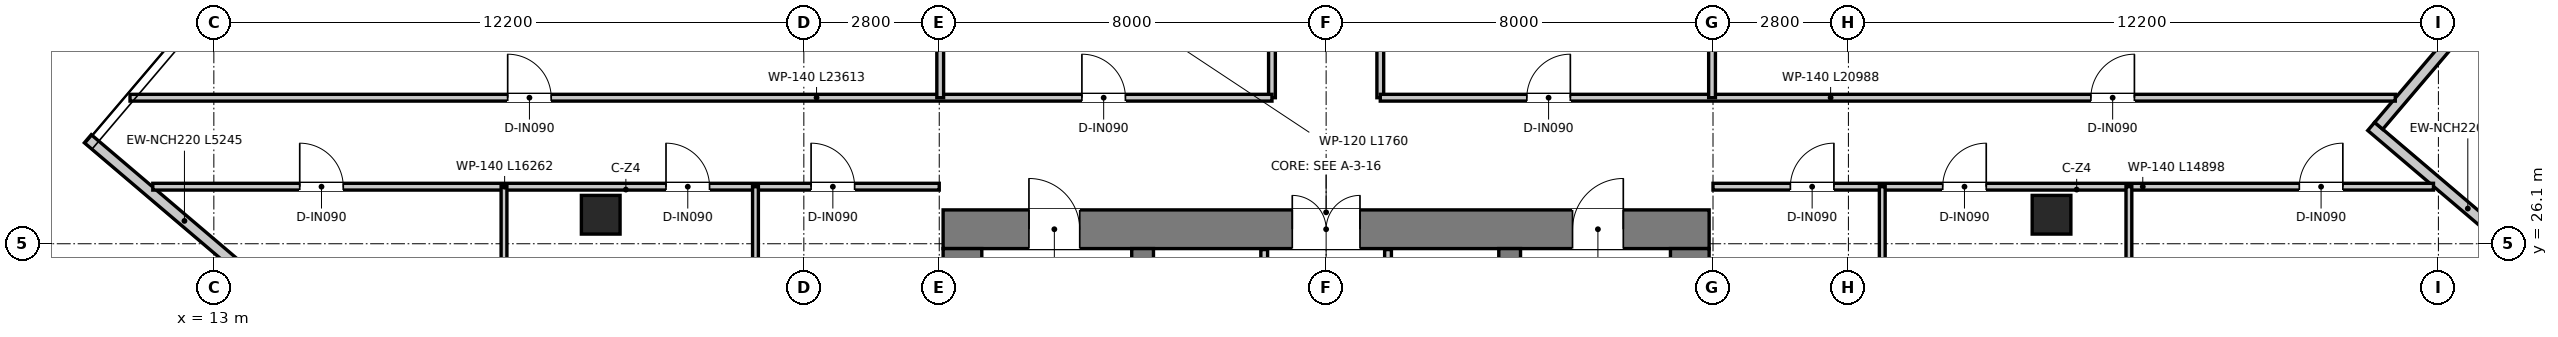
"""IFC4 building model, lengths in metres.
Left out: names, types, materials, properties, quantities, classifications, styles, units other than length and angle.
Written with IfcOpenShell. Run it as: python <this file> out.ifc"""

import sys

from ifc_helpers import new_model, si_unit, direction, frame, frame_2d, origin, origin_2d, place, context, subcontext, project, spatial, rectangle, extrude, source, transform, mapped, element, fill, save


model = new_model("IFC4")
c1 = context("Model", 3, precision=1e-05, world=origin(), true_north=direction((0.0, 1.0)))
c2 = subcontext(c1, "Body", "Model", "MODEL_VIEW")
j1 = project(units=[si_unit("LENGTHUNIT", "METRE"), si_unit("PLANEANGLEUNIT", "RADIAN")], contexts=[c1])
p1 = place(None, origin())
s1 = spatial("IfcSite", under=j1, at=p1, CompositionType="ELEMENT")
p2 = place(p1, origin())
s2 = spatial("IfcBuilding", under=s1, at=p2, CompositionType="ELEMENT")
p3 = place(p2, frame((0.0, 0.0, 207.3)))
s3 = spatial("IfcBuildingStorey", under=s2, at=p3, CompositionType="ELEMENT", Elevation=207.3)
p4 = place(p3, frame((28.08, 26.4, 0.0), z_axis=(0.0, 0.0, 1.0), x_axis=(1.0, 0.0, 0.0)))
e1 = element("IfcWall", 1, at=p4, inside=s3, PredefinedType="SHEAR", context=c2, shape_type="SweptSolid", body=[
    extrude(rectangle(XDim=15.84, YDim=0.8, at=frame_2d((7.92, 0.0))), origin(), (0.0, 0.0, 1.0), 3.95),
])
p5 = place(p4, frame((7.22, 0.0, 0.0)))
e2 = element("IfcOpeningElement", 2, at=p5, cuts=e1, PredefinedType="OPENING", context=c2, shape_type="SweptSolid", body=[
    extrude(rectangle(XDim=1.4, YDim=2.2, at=frame_2d((0.7, 1.1))), frame((0.0, 0.41, 0.0), z_axis=(0.0, -1.0, 0.0), x_axis=(1.0, 0.0, 0.0)), (0.0, 0.0, 1.0), 0.82),
])
p6 = place(p4, frame((1.775, 0.0, 0.0)))
e3 = element("IfcOpeningElement", 3, at=p6, cuts=e1, PredefinedType="OPENING", context=c2, shape_type="SweptSolid", body=[
    extrude(rectangle(XDim=1.05, YDim=2.1, at=frame_2d((0.525, 1.05))), frame((0.0, 0.41, 0.0), z_axis=(0.0, -1.0, 0.0), x_axis=(1.0, 0.0, 0.0)), (0.0, 0.0, 1.0), 0.82),
])
p7 = place(p4, frame((13.015, 0.0, 0.0)))
e4 = element("IfcOpeningElement", 4, at=p7, cuts=e1, PredefinedType="OPENING", context=c2, shape_type="SweptSolid", body=[
    extrude(rectangle(XDim=1.05, YDim=2.1, at=frame_2d((0.525, 1.05))), frame((0.0, 0.41, 0.0), z_axis=(0.0, -1.0, 0.0), x_axis=(1.0, 0.0, 0.0)), (0.0, 0.0, 1.0), 0.82),
])
for number, where, z_axis, x_axis in (
    (5, (28.48, 11.3, 0.0), (0.0, 0.0, 1.0), (0.0, 1.0, 0.0)),
    (6, (43.52, 11.3, 0.0), (0.0, 0.0, 1.0), (0.0, 1.0, 0.0)),
):
    element("IfcWall", number, at=place(p3, frame(where, z_axis=z_axis, x_axis=x_axis)), inside=s3, PredefinedType="SHEAR", context=c2, shape_type="SweptSolid", body=[
        extrude(rectangle(XDim=14.7, YDim=0.8, at=frame_2d((7.35, 0.0))), origin(), (0.0, 0.0, 1.0), 3.95),
    ])
p8 = place(p3, frame((32.205, 13.22, 0.0), z_axis=(0.0, 0.0, 1.0), x_axis=(0.0, 1.0, 0.0)))
e7 = element("IfcWall", 7, at=p8, inside=s3, PredefinedType="SHEAR", context=c2, shape_type="SweptSolid", body=[
    extrude(rectangle(XDim=12.78, YDim=0.45, at=frame_2d((6.39, 0.0))), origin(), (0.0, 0.0, 1.0), 3.95),
])
p9 = place(p8, frame((10.58, 0.0, 0.0)))
e8 = element("IfcOpeningElement", 8, at=p9, cuts=e7, PredefinedType="OPENING", context=c2, shape_type="SweptSolid", body=[
    extrude(rectangle(XDim=1.1, YDim=2.15, at=frame_2d((0.55, 1.075))), frame((0.0, 0.235, 0.0), z_axis=(0.0, -1.0, 0.0), x_axis=(1.0, 0.0, 0.0)), (0.0, 0.0, 1.0), 0.47),
])
p10 = place(p3, frame((39.795, 13.22, 0.0), z_axis=(0.0, 0.0, 1.0), x_axis=(0.0, 1.0, 0.0)))
e9 = element("IfcWall", 9, at=p10, inside=s3, PredefinedType="SHEAR", context=c2, shape_type="SweptSolid", body=[
    extrude(rectangle(XDim=12.78, YDim=0.45, at=frame_2d((6.39, 0.0))), origin(), (0.0, 0.0, 1.0), 3.95),
])
p11 = place(p10, frame((10.58, 0.0, 0.0)))
e10 = element("IfcOpeningElement", 10, at=p11, cuts=e9, PredefinedType="OPENING", context=c2, shape_type="SweptSolid", body=[
    extrude(rectangle(XDim=1.1, YDim=2.15, at=frame_2d((0.55, 1.075))), frame((0.0, 0.235, 0.0), z_axis=(0.0, -1.0, 0.0), x_axis=(1.0, 0.0, 0.0)), (0.0, 0.0, 1.0), 0.47),
])
m1 = source(origin(), c2, "Body", "SweptSolid", [
    extrude(rectangle(XDim=0.8, YDim=0.8, at=origin_2d()), origin(), (0.0, 0.0, 1.0), 3.95),
])
for number, where, z_axis, x_axis in (
    (11, (21.0, 26.7, 0.0), (0.0, 0.0, 1.0), (1.0, 0.0, 0.0)),
    (12, (51.0, 26.7, 0.0), (0.0, 0.0, 1.0), (1.0, 0.0, 0.0)),
):
    element("IfcColumn", number, at=place(p3, frame(where, z_axis=z_axis, x_axis=x_axis)), inside=s3, PredefinedType="COLUMN", context=c2, shape_type="MappedRepresentation", body=[
        mapped(m1, transform((0.0, 0.0, 0.0), x_axis=(1.0, 0.0, 0.0), y_axis=(0.0, 1.0, 0.0), z_axis=(0.0, 0.0, 1.0), scale=1.0)),
    ])
for number, where, z_axis, x_axis in (
    (13, (10.394, 28.271, 0.0), (0.0, 0.0, 1.0), (0.762, -0.648, 0.0)),
    (14, (61.606, 25.129, 0.0), (0.0, 0.0, 1.0), (-0.762, 0.648, 0.0)),
):
    element("IfcWall", number, at=place(p3, frame(where, z_axis=z_axis, x_axis=x_axis)), inside=s3, PredefinedType="ELEMENTEDWALL", context=c2, shape_type="SweptSolid", body=[
        extrude(rectangle(XDim=5.245, YDim=0.22, at=frame_2d((2.623, 0.0))), origin(), (0.0, 0.0, 1.0), 3.67),
    ])
p12 = place(p3, frame((57.765, 28.539, 0.0), z_axis=(0.0, 0.0, 1.0), x_axis=(0.647789440707, 0.761819427757, 0.0)))
e15 = element("IfcWall", 15, at=p12, inside=s3, PredefinedType="ELEMENTEDWALL", context=c2, shape_type="SweptSolid", body=[
    extrude(rectangle(XDim=5.025, YDim=0.22, at=frame_2d((2.512, 0.0))), origin(), (0.0, 0.0, 1.0), 3.67),
])
p13 = place(p3, frame((34.72, 20.2, 0.0), z_axis=(0.0, 0.0, 1.0), x_axis=(0.0, 1.0, 0.0)))
e16 = element("IfcWall", 16, at=p13, inside=s3, PredefinedType="PARTITIONING", context=c2, shape_type="SweptSolid", body=[
    extrude(rectangle(XDim=5.78, YDim=0.14, at=frame_2d((2.89, 0.0))), origin(), (0.0, 0.0, 1.0), 2.67),
])
p14 = place(p13, frame((1.05, 0.0, 0.0)))
e17 = element("IfcOpeningElement", 17, at=p14, cuts=e16, PredefinedType="OPENING", context=c2, shape_type="SweptSolid", body=[
    extrude(rectangle(XDim=0.9, YDim=2.1, at=frame_2d((0.45, 1.05))), frame((0.0, 0.08, 0.0), z_axis=(0.0, -1.0, 0.0), x_axis=(1.0, 0.0, 0.0)), (0.0, 0.0, 1.0), 0.16),
])
p15 = place(p3, frame((37.28, 20.2, 0.0), z_axis=(0.0, 0.0, 1.0), x_axis=(0.0, 1.0, 0.0)))
e18 = element("IfcWall", 18, at=p15, inside=s3, PredefinedType="PARTITIONING", context=c2, shape_type="SweptSolid", body=[
    extrude(rectangle(XDim=5.78, YDim=0.14, at=frame_2d((2.89, 0.0))), origin(), (0.0, 0.0, 1.0), 2.67),
])
p16 = place(p15, frame((0.95, 0.0, 0.0)))
e19 = element("IfcOpeningElement", 19, at=p16, cuts=e18, PredefinedType="OPENING", context=c2, shape_type="SweptSolid", body=[
    extrude(rectangle(XDim=1.1, YDim=2.15, at=frame_2d((0.55, 1.075))), frame((0.0, 0.08, 0.0), z_axis=(0.0, -1.0, 0.0), x_axis=(1.0, 0.0, 0.0)), (0.0, 0.0, 1.0), 0.16),
])
p17 = place(p3, frame((34.88, 29.12, 0.0), z_axis=(0.0, 0.0, 1.0), x_axis=(0.0, 1.0, 0.0)))
e20 = element("IfcWall", 20, at=p17, inside=s3, PredefinedType="PARTITIONING", context=c2, shape_type="SweptSolid", body=[
    extrude(rectangle(XDim=11.76, YDim=0.14, at=frame_2d((5.88, 0.0))), origin(), (0.0, 0.0, 1.0), 3.03),
])
p18 = place(p17, frame((4.085, 0.0, 0.0)))
e21 = element("IfcOpeningElement", 21, at=p18, cuts=e20, PredefinedType="OPENING", context=c2, shape_type="SweptSolid", body=[
    extrude(rectangle(XDim=0.95, YDim=2.1, at=frame_2d((0.475, 1.05))), frame((0.0, 0.08, 0.0), z_axis=(0.0, -1.0, 0.0), x_axis=(1.0, 0.0, 0.0)), (0.0, 0.0, 1.0), 0.16),
])
p19 = place(p17, frame((6.82, 0.0, 0.0)))
e22 = element("IfcOpeningElement", 22, at=p19, cuts=e20, PredefinedType="OPENING", context=c2, shape_type="SweptSolid", body=[
    extrude(rectangle(XDim=0.9, YDim=2.1, at=frame_2d((0.45, 1.05))), frame((0.0, 0.08, 0.0), z_axis=(0.0, -1.0, 0.0), x_axis=(1.0, 0.0, 0.0)), (0.0, 0.0, 1.0), 0.16),
])
p20 = place(p17, frame((9.83, 0.0, 0.0)))
e23 = element("IfcOpeningElement", 23, at=p20, cuts=e20, PredefinedType="OPENING", context=c2, shape_type="SweptSolid", body=[
    extrude(rectangle(XDim=0.9, YDim=2.1, at=frame_2d((0.45, 1.05))), frame((0.0, 0.08, 0.0), z_axis=(0.0, -1.0, 0.0), x_axis=(1.0, 0.0, 0.0)), (0.0, 0.0, 1.0), 0.16),
])
p21 = place(p3, frame((37.12, 29.12, 0.0), z_axis=(0.0, 0.0, 1.0), x_axis=(0.0, 1.0, 0.0)))
e24 = element("IfcWall", 24, at=p21, inside=s3, PredefinedType="PARTITIONING", context=c2, shape_type="SweptSolid", body=[
    extrude(rectangle(XDim=11.76, YDim=0.14, at=frame_2d((5.88, 0.0))), origin(), (0.0, 0.0, 1.0), 3.03),
])
p22 = place(p21, frame((3.205, 0.0, 0.0)))
e25 = element("IfcOpeningElement", 25, at=p22, cuts=e24, PredefinedType="OPENING", context=c2, shape_type="SweptSolid", body=[
    extrude(rectangle(XDim=0.95, YDim=2.1, at=frame_2d((0.475, 1.05))), frame((0.0, 0.08, 0.0), z_axis=(0.0, -1.0, 0.0), x_axis=(1.0, 0.0, 0.0)), (0.0, 0.0, 1.0), 0.16),
])
p23 = place(p21, frame((6.82, 0.0, 0.0)))
e26 = element("IfcOpeningElement", 26, at=p23, cuts=e24, PredefinedType="OPENING", context=c2, shape_type="SweptSolid", body=[
    extrude(rectangle(XDim=0.9, YDim=2.1, at=frame_2d((0.45, 1.05))), frame((0.0, 0.08, 0.0), z_axis=(0.0, -1.0, 0.0), x_axis=(1.0, 0.0, 0.0)), (0.0, 0.0, 1.0), 0.16),
])
p24 = place(p21, frame((9.83, 0.0, 0.0)))
e27 = element("IfcOpeningElement", 27, at=p24, cuts=e24, PredefinedType="OPENING", context=c2, shape_type="SweptSolid", body=[
    extrude(rectangle(XDim=0.9, YDim=2.1, at=frame_2d((0.45, 1.05))), frame((0.0, 0.08, 0.0), z_axis=(0.0, -1.0, 0.0), x_axis=(1.0, 0.0, 0.0)), (0.0, 0.0, 1.0), 0.16),
])
p25 = place(p3, frame((11.267, 29.12, 0.0), z_axis=(0.0, 0.0, 1.0), x_axis=(1.0, 0.0, 0.0)))
e28 = element("IfcWall", 28, at=p25, inside=s3, PredefinedType="PARTITIONING", context=c2, shape_type="SweptSolid", body=[
    extrude(rectangle(XDim=23.613, YDim=0.14, at=frame_2d((11.807, 0.0))), origin(), (0.0, 0.0, 1.0), 3.03),
])
p26 = place(p25, frame((19.683, 0.0, 0.0)))
e29 = element("IfcOpeningElement", 29, at=p26, cuts=e28, PredefinedType="OPENING", context=c2, shape_type="SweptSolid", body=[
    extrude(rectangle(XDim=0.9, YDim=2.1, at=frame_2d((0.45, 1.05))), frame((0.0, 0.08, 0.0), z_axis=(0.0, -1.0, 0.0), x_axis=(1.0, 0.0, 0.0)), (0.0, 0.0, 1.0), 0.16),
])
p27 = place(p25, frame((7.809, 0.0, 0.0)))
e30 = element("IfcOpeningElement", 30, at=p27, cuts=e28, PredefinedType="OPENING", context=c2, shape_type="SweptSolid", body=[
    extrude(rectangle(XDim=0.9, YDim=2.1, at=frame_2d((0.45, 1.05))), frame((0.0, 0.08, 0.0), z_axis=(0.0, -1.0, 0.0), x_axis=(1.0, 0.0, 0.0)), (0.0, 0.0, 1.0), 0.16),
])
p28 = place(p3, frame((37.12, 29.12, 0.0), z_axis=(0.0, 0.0, 1.0), x_axis=(1.0, 0.0, 0.0)))
e31 = element("IfcWall", 31, at=p28, inside=s3, PredefinedType="PARTITIONING", context=c2, shape_type="SweptSolid", body=[
    extrude(rectangle(XDim=20.988, YDim=0.14, at=frame_2d((10.494, 0.0))), origin(), (0.0, 0.0, 1.0), 3.03),
])
p29 = place(p28, frame((3.03, 0.0, 0.0)))
e32 = element("IfcOpeningElement", 32, at=p29, cuts=e31, PredefinedType="OPENING", context=c2, shape_type="SweptSolid", body=[
    extrude(rectangle(XDim=0.9, YDim=2.1, at=frame_2d((0.45, 1.05))), frame((0.0, 0.08, 0.0), z_axis=(0.0, -1.0, 0.0), x_axis=(1.0, 0.0, 0.0)), (0.0, 0.0, 1.0), 0.16),
])
p30 = place(p28, frame((14.694, 0.0, 0.0)))
e33 = element("IfcOpeningElement", 33, at=p30, cuts=e31, PredefinedType="OPENING", context=c2, shape_type="SweptSolid", body=[
    extrude(rectangle(XDim=0.9, YDim=2.1, at=frame_2d((0.45, 1.05))), frame((0.0, 0.08, 0.0), z_axis=(0.0, -1.0, 0.0), x_axis=(1.0, 0.0, 0.0)), (0.0, 0.0, 1.0), 0.16),
])
p31 = place(p3, frame((11.738, 27.28, 0.0), z_axis=(0.0, 0.0, 1.0), x_axis=(1.0, 0.0, 0.0)))
e34 = element("IfcWall", 34, at=p31, inside=s3, PredefinedType="PARTITIONING", context=c2, shape_type="SweptSolid", body=[
    extrude(rectangle(XDim=16.262, YDim=0.14, at=frame_2d((8.131, 0.0))), origin(), (0.0, 0.0, 1.0), 3.03),
])
p32 = place(p31, frame((3.038, 0.0, 0.0)))
e35 = element("IfcOpeningElement", 35, at=p32, cuts=e34, PredefinedType="OPENING", context=c2, shape_type="SweptSolid", body=[
    extrude(rectangle(XDim=0.9, YDim=2.1, at=frame_2d((0.45, 1.05))), frame((0.0, 0.08, 0.0), z_axis=(0.0, -1.0, 0.0), x_axis=(1.0, 0.0, 0.0)), (0.0, 0.0, 1.0), 0.16),
])
p33 = place(p31, frame((10.612, 0.0, 0.0)))
e36 = element("IfcOpeningElement", 36, at=p33, cuts=e34, PredefinedType="OPENING", context=c2, shape_type="SweptSolid", body=[
    extrude(rectangle(XDim=0.9, YDim=2.1, at=frame_2d((0.45, 1.05))), frame((0.0, 0.08, 0.0), z_axis=(0.0, -1.0, 0.0), x_axis=(1.0, 0.0, 0.0)), (0.0, 0.0, 1.0), 0.16),
])
p34 = place(p31, frame((13.612, 0.0, 0.0)))
e37 = element("IfcOpeningElement", 37, at=p34, cuts=e34, PredefinedType="OPENING", context=c2, shape_type="SweptSolid", body=[
    extrude(rectangle(XDim=0.9, YDim=2.1, at=frame_2d((0.45, 1.05))), frame((0.0, 0.08, 0.0), z_axis=(0.0, -1.0, 0.0), x_axis=(1.0, 0.0, 0.0)), (0.0, 0.0, 1.0), 0.16),
])
p35 = place(p3, frame((44.0, 27.28, 0.0), z_axis=(0.0, 0.0, 1.0), x_axis=(1.0, 0.0, 0.0)))
e38 = element("IfcWall", 38, at=p35, inside=s3, PredefinedType="PARTITIONING", context=c2, shape_type="SweptSolid", body=[
    extrude(rectangle(XDim=14.898, YDim=0.14, at=frame_2d((7.449, 0.0))), origin(), (0.0, 0.0, 1.0), 3.03),
])
p36 = place(p35, frame((1.6, 0.0, 0.0)))
e39 = element("IfcOpeningElement", 39, at=p36, cuts=e38, PredefinedType="OPENING", context=c2, shape_type="SweptSolid", body=[
    extrude(rectangle(XDim=0.9, YDim=2.1, at=frame_2d((0.45, 1.05))), frame((0.0, 0.08, 0.0), z_axis=(0.0, -1.0, 0.0), x_axis=(1.0, 0.0, 0.0)), (0.0, 0.0, 1.0), 0.16),
])
p37 = place(p35, frame((4.75, 0.0, 0.0)))
e40 = element("IfcOpeningElement", 40, at=p37, cuts=e38, PredefinedType="OPENING", context=c2, shape_type="SweptSolid", body=[
    extrude(rectangle(XDim=0.9, YDim=2.1, at=frame_2d((0.45, 1.05))), frame((0.0, 0.08, 0.0), z_axis=(0.0, -1.0, 0.0), x_axis=(1.0, 0.0, 0.0)), (0.0, 0.0, 1.0), 0.16),
])
p38 = place(p35, frame((12.124, 0.0, 0.0)))
e41 = element("IfcOpeningElement", 41, at=p38, cuts=e38, PredefinedType="OPENING", context=c2, shape_type="SweptSolid", body=[
    extrude(rectangle(XDim=0.9, YDim=2.1, at=frame_2d((0.45, 1.05))), frame((0.0, 0.08, 0.0), z_axis=(0.0, -1.0, 0.0), x_axis=(1.0, 0.0, 0.0)), (0.0, 0.0, 1.0), 0.16),
])
for number, where, z_axis, x_axis in (
    (42, (28.02, 29.12, 0.0), (0.0, 0.0, 1.0), (0.0, 1.0, 0.0)),
    (43, (43.98, 29.12, 0.0), (0.0, 0.0, 1.0), (0.0, 1.0, 0.0)),
):
    element("IfcWall", number, at=place(p3, frame(where, z_axis=z_axis, x_axis=x_axis)), inside=s3, PredefinedType="PARTITIONING", context=c2, shape_type="SweptSolid", body=[
        extrude(rectangle(XDim=5.46, YDim=0.14, at=frame_2d((2.73, 0.0))), origin(), (0.0, 0.0, 1.0), 3.37),
    ])
p39 = place(p3, frame((19.0, 14.364, 0.0), z_axis=(0.0, 0.0, 1.0), x_axis=(0.0, 1.0, 0.0)))
e44 = element("IfcWall", 44, at=p39, inside=s3, PredefinedType="PARTITIONING", context=c2, shape_type="SweptSolid", body=[
    extrude(rectangle(XDim=12.916, YDim=0.12, at=frame_2d((6.458, 0.0))), origin(), (0.0, 0.0, 1.0), 3.67),
])
p40 = place(p3, frame((24.2, 9.943, 0.0), z_axis=(0.0, 0.0, 1.0), x_axis=(0.0, 1.0, 0.0)))
e45 = element("IfcWall", 45, at=p40, inside=s3, PredefinedType="PARTITIONING", context=c2, shape_type="SweptSolid", body=[
    extrude(rectangle(XDim=17.337, YDim=0.12, at=frame_2d((8.669, 0.0))), origin(), (0.0, 0.0, 1.0), 3.18),
])
p41 = place(p3, frame((47.5, 8.717, 0.0), z_axis=(0.0, 0.0, 1.0), x_axis=(0.0, 1.0, 0.0)))
e46 = element("IfcWall", 46, at=p41, inside=s3, PredefinedType="PARTITIONING", context=c2, shape_type="SweptSolid", body=[
    extrude(rectangle(XDim=18.563, YDim=0.12, at=frame_2d((9.281, 0.0))), origin(), (0.0, 0.0, 1.0), 3.18),
])
p42 = place(p3, frame((52.6, 14.715, 0.0), z_axis=(0.0, 0.0, 1.0), x_axis=(0.0, 1.0, 0.0)))
e47 = element("IfcWall", 47, at=p42, inside=s3, PredefinedType="PARTITIONING", context=c2, shape_type="SweptSolid", body=[
    extrude(rectangle(XDim=12.565, YDim=0.12, at=frame_2d((6.283, 0.0))), origin(), (0.0, 0.0, 1.0), 3.67),
])
p43 = place(p5, origin())
e48 = element("IfcDoor", 48, at=p43, inside=s3, OperationType="DOUBLE_DOOR_SINGLE_SWING", PredefinedType="DOOR", context=c2, shape_type="SweptSolid", body=[
    extrude(rectangle(XDim=1.4, YDim=2.2, at=frame_2d((0.7, 1.1))), frame((0.0, 0.025, 0.0), z_axis=(0.0, -1.0, 0.0), x_axis=(1.0, 0.0, 0.0)), (0.0, 0.0, 1.0), 0.05),
])
fill(e2, e48)
p44 = place(p6, origin())
e49 = element("IfcDoor", 49, at=p44, inside=s3, OperationType="SINGLE_SWING_LEFT", PredefinedType="DOOR", context=c2, shape_type="SweptSolid", body=[
    extrude(rectangle(XDim=1.05, YDim=2.1, at=frame_2d((0.525, 1.05))), frame((0.0, 0.025, 0.0), z_axis=(0.0, -1.0, 0.0), x_axis=(1.0, 0.0, 0.0)), (0.0, 0.0, 1.0), 0.05),
])
fill(e3, e49)
p45 = place(p7, origin())
e50 = element("IfcDoor", 50, at=p45, inside=s3, OperationType="SINGLE_SWING_RIGHT", PredefinedType="DOOR", context=c2, shape_type="SweptSolid", body=[
    extrude(rectangle(XDim=1.05, YDim=2.1, at=frame_2d((0.525, 1.05))), frame((0.0, 0.025, 0.0), z_axis=(0.0, -1.0, 0.0), x_axis=(1.0, 0.0, 0.0)), (0.0, 0.0, 1.0), 0.05),
])
fill(e4, e50)
p46 = place(p26, origin())
e51 = element("IfcDoor", 51, at=p46, inside=s3, OperationType="SINGLE_SWING_LEFT", PredefinedType="DOOR", context=c2, shape_type="SweptSolid", body=[
    extrude(rectangle(XDim=0.9, YDim=2.1, at=frame_2d((0.45, 1.05))), frame((0.0, 0.025, 0.0), z_axis=(0.0, -1.0, 0.0), x_axis=(1.0, 0.0, 0.0)), (0.0, 0.0, 1.0), 0.05),
])
fill(e29, e51)
p47 = place(p29, origin())
e52 = element("IfcDoor", 52, at=p47, inside=s3, OperationType="SINGLE_SWING_RIGHT", PredefinedType="DOOR", context=c2, shape_type="SweptSolid", body=[
    extrude(rectangle(XDim=0.9, YDim=2.1, at=frame_2d((0.45, 1.05))), frame((0.0, 0.025, 0.0), z_axis=(0.0, -1.0, 0.0), x_axis=(1.0, 0.0, 0.0)), (0.0, 0.0, 1.0), 0.05),
])
fill(e32, e52)
p48 = place(p27, origin())
e53 = element("IfcDoor", 53, at=p48, inside=s3, OperationType="SINGLE_SWING_LEFT", PredefinedType="DOOR", context=c2, shape_type="SweptSolid", body=[
    extrude(rectangle(XDim=0.9, YDim=2.1, at=frame_2d((0.45, 1.05))), frame((0.0, 0.025, 0.0), z_axis=(0.0, -1.0, 0.0), x_axis=(1.0, 0.0, 0.0)), (0.0, 0.0, 1.0), 0.05),
])
fill(e30, e53)
p49 = place(p30, origin())
e54 = element("IfcDoor", 54, at=p49, inside=s3, OperationType="SINGLE_SWING_RIGHT", PredefinedType="DOOR", context=c2, shape_type="SweptSolid", body=[
    extrude(rectangle(XDim=0.9, YDim=2.1, at=frame_2d((0.45, 1.05))), frame((0.0, 0.025, 0.0), z_axis=(0.0, -1.0, 0.0), x_axis=(1.0, 0.0, 0.0)), (0.0, 0.0, 1.0), 0.05),
])
fill(e33, e54)
p50 = place(p32, origin())
e55 = element("IfcDoor", 55, at=p50, inside=s3, OperationType="SINGLE_SWING_LEFT", PredefinedType="DOOR", context=c2, shape_type="SweptSolid", body=[
    extrude(rectangle(XDim=0.9, YDim=2.1, at=frame_2d((0.45, 1.05))), frame((0.0, 0.025, 0.0), z_axis=(0.0, -1.0, 0.0), x_axis=(1.0, 0.0, 0.0)), (0.0, 0.0, 1.0), 0.05),
])
fill(e35, e55)
p51 = place(p33, origin())
e56 = element("IfcDoor", 56, at=p51, inside=s3, OperationType="SINGLE_SWING_LEFT", PredefinedType="DOOR", context=c2, shape_type="SweptSolid", body=[
    extrude(rectangle(XDim=0.9, YDim=2.1, at=frame_2d((0.45, 1.05))), frame((0.0, 0.025, 0.0), z_axis=(0.0, -1.0, 0.0), x_axis=(1.0, 0.0, 0.0)), (0.0, 0.0, 1.0), 0.05),
])
fill(e36, e56)
p52 = place(p34, origin())
e57 = element("IfcDoor", 57, at=p52, inside=s3, OperationType="SINGLE_SWING_LEFT", PredefinedType="DOOR", context=c2, shape_type="SweptSolid", body=[
    extrude(rectangle(XDim=0.9, YDim=2.1, at=frame_2d((0.45, 1.05))), frame((0.0, 0.025, 0.0), z_axis=(0.0, -1.0, 0.0), x_axis=(1.0, 0.0, 0.0)), (0.0, 0.0, 1.0), 0.05),
])
fill(e37, e57)
p53 = place(p36, origin())
e58 = element("IfcDoor", 58, at=p53, inside=s3, OperationType="SINGLE_SWING_RIGHT", PredefinedType="DOOR", context=c2, shape_type="SweptSolid", body=[
    extrude(rectangle(XDim=0.9, YDim=2.1, at=frame_2d((0.45, 1.05))), frame((0.0, 0.025, 0.0), z_axis=(0.0, -1.0, 0.0), x_axis=(1.0, 0.0, 0.0)), (0.0, 0.0, 1.0), 0.05),
])
fill(e39, e58)
p54 = place(p37, origin())
e59 = element("IfcDoor", 59, at=p54, inside=s3, OperationType="SINGLE_SWING_RIGHT", PredefinedType="DOOR", context=c2, shape_type="SweptSolid", body=[
    extrude(rectangle(XDim=0.9, YDim=2.1, at=frame_2d((0.45, 1.05))), frame((0.0, 0.025, 0.0), z_axis=(0.0, -1.0, 0.0), x_axis=(1.0, 0.0, 0.0)), (0.0, 0.0, 1.0), 0.05),
])
fill(e40, e59)
p55 = place(p38, origin())
e60 = element("IfcDoor", 60, at=p55, inside=s3, OperationType="SINGLE_SWING_RIGHT", PredefinedType="DOOR", context=c2, shape_type="SweptSolid", body=[
    extrude(rectangle(XDim=0.9, YDim=2.1, at=frame_2d((0.45, 1.05))), frame((0.0, 0.025, 0.0), z_axis=(0.0, -1.0, 0.0), x_axis=(1.0, 0.0, 0.0)), (0.0, 0.0, 1.0), 0.05),
])
fill(e41, e60)
save(model, sys.argv[1])
